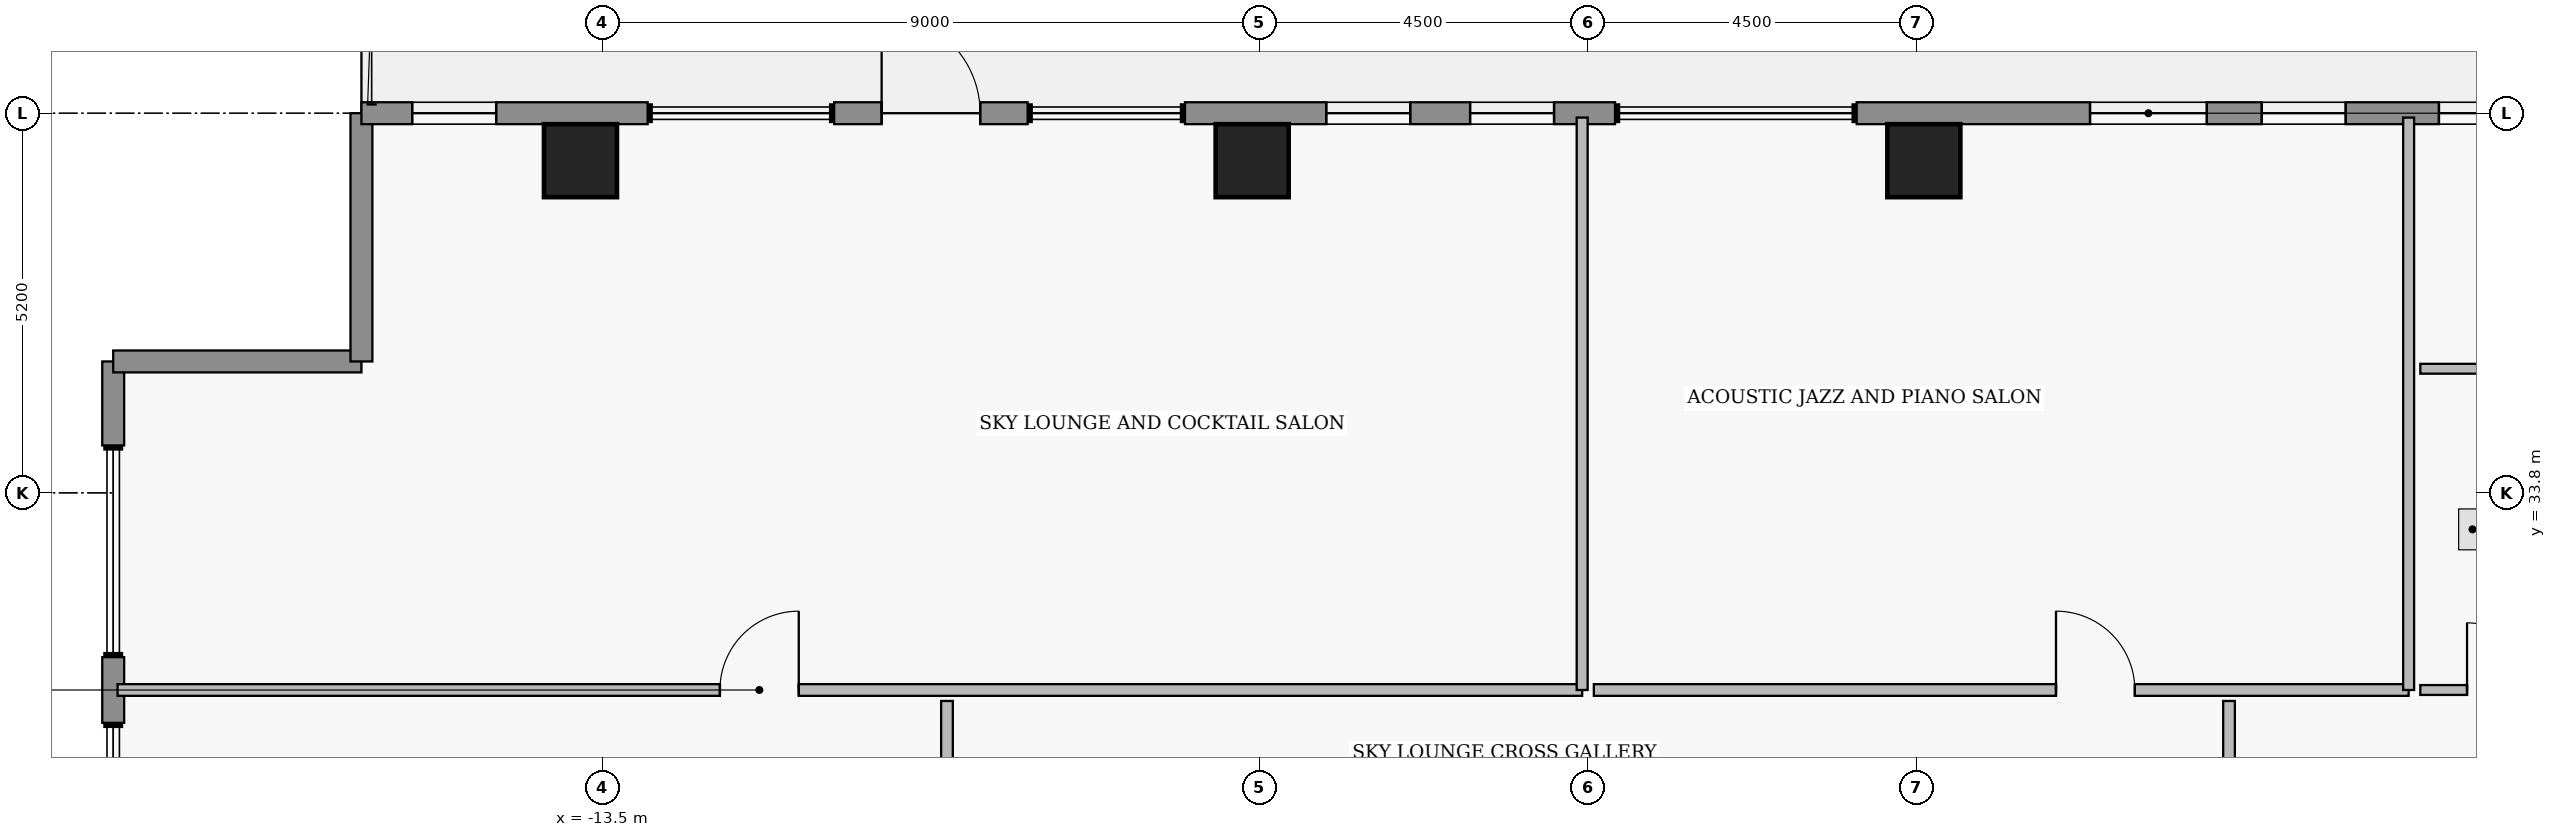
"""IFC4 building model, lengths in metres.
Left out: names, types, materials, properties, quantities, classifications, styles, units other than length and angle.
Written with IfcOpenShell. Run it as: python <this file> out.ifc"""

import sys

from ifc_helpers import new_model, si_unit, direction, frame, frame_2d, origin, origin_2d, place, context, subcontext, project, spatial, rectangle, extrude, element, fill, save


model = new_model("IFC4")
c1 = context("Model", 3, precision=1e-05, world=origin(), true_north=direction((0.0, 1.0)))
c2 = subcontext(c1, "Body", "Model", "MODEL_VIEW")
j1 = project(units=[si_unit("LENGTHUNIT", "METRE"), si_unit("PLANEANGLEUNIT", "RADIAN")], contexts=[c1])
p1 = place(None, origin())
s1 = spatial("IfcSite", under=j1, at=p1, CompositionType="ELEMENT")
p2 = place(p1, origin())
s2 = spatial("IfcBuilding", under=s1, at=p2, CompositionType="ELEMENT")
p3 = place(p2, frame((0.0, 0.0, 288.45)))
s3 = spatial("IfcBuildingStorey", under=s2, at=p3, CompositionType="ELEMENT", Elevation=288.45)
for number, where, z_axis, x_axis in (
    (1, (-13.8, 38.35, 0.0), (0.0, 0.0, 1.0), (1.0, 0.0, 0.0)),
    (2, (-4.6, 38.35, 0.0), (0.0, 0.0, 1.0), (1.0, 0.0, 0.0)),
    (3, (4.6, 38.35, 0.0), (0.0, 0.0, 1.0), (1.0, 0.0, 0.0)),
):
    element("IfcColumn", number, at=place(p3, frame(where, z_axis=z_axis, x_axis=x_axis)), inside=s3, PredefinedType="COLUMN", context=c2, shape_type="SweptSolid", body=[
        extrude(rectangle(XDim=1.0, YDim=1.0, at=origin_2d()), origin(), (0.0, 0.0, 1.0), 4.4),
    ])
p4 = place(p3, frame((-20.2, 30.65, 0.0), z_axis=(0.0, 0.0, 1.0), x_axis=(0.0, 1.0, 0.0)))
e4 = element("IfcWall", 4, at=p4, inside=s3, PredefinedType="STANDARD", context=c2, shape_type="SweptSolid", body=[
    extrude(rectangle(XDim=0.9, YDim=0.3, at=frame_2d((0.45, 0.0))), origin(), (0.0, 0.0, 1.0), 4.18),
])
p5 = place(p3, frame((-20.2, 34.45, 0.0), z_axis=(0.0, 0.0, 1.0), x_axis=(0.0, 1.0, 0.0)))
e5 = element("IfcWall", 5, at=p5, inside=s3, PredefinedType="STANDARD", context=c2, shape_type="SweptSolid", body=[
    extrude(rectangle(XDim=1.15, YDim=0.3, at=frame_2d((0.575, 0.0))), origin(), (0.0, 0.0, 1.0), 4.18),
])
for number, where, z_axis, x_axis in (
    (6, (-20.2, 35.6, 0.0), (0.0, 0.0, 1.0), (1.0, 0.0, 0.0)),
    (7, (-16.8, 35.6, 0.0), (0.0, 0.0, 1.0), (0.0, 1.0, 0.0)),
):
    element("IfcWall", number, at=place(p3, frame(where, z_axis=z_axis, x_axis=x_axis)), inside=s3, PredefinedType="STANDARD", context=c2, shape_type="SweptSolid", body=[
        extrude(rectangle(XDim=3.4, YDim=0.3, at=frame_2d((1.7, 0.0))), origin(), (0.0, 0.0, 1.0), 4.18),
    ])
p6 = place(p3, frame((-16.8, 39.0, 0.0), z_axis=(0.0, 0.0, 1.0), x_axis=(1.0, 0.0, 0.0)))
e8 = element("IfcWall", 8, at=p6, inside=s3, PredefinedType="STANDARD", context=c2, shape_type="SweptSolid", body=[
    extrude(rectangle(XDim=3.92, YDim=0.3, at=frame_2d((1.96, 0.0))), origin(), (0.0, 0.0, 1.0), 4.18),
])
p7 = place(p6, frame((0.695, 0.0, 0.95)))
e9 = element("IfcOpeningElement", 9, at=p7, cuts=e8, PredefinedType="OPENING", context=c2, shape_type="SweptSolid", body=[
    extrude(rectangle(XDim=1.15, YDim=1.55, at=frame_2d((0.575, 0.775))), frame((0.0, 0.16, 0.0), z_axis=(0.0, -1.0, 0.0), x_axis=(1.0, 0.0, 0.0)), (0.0, 0.0, 1.0), 0.32),
])
p8 = place(p3, frame((-10.325, 39.0, 0.0), z_axis=(0.0, 0.0, 1.0), x_axis=(1.0, 0.0, 0.0)))
e10 = element("IfcWall", 10, at=p8, inside=s3, PredefinedType="STANDARD", context=c2, shape_type="SweptSolid", body=[
    extrude(rectangle(XDim=2.65, YDim=0.3, at=frame_2d((1.325, 0.0))), origin(), (0.0, 0.0, 1.0), 4.18),
])
p9 = place(p8, frame((0.65, 0.0, 0.0)))
e11 = element("IfcOpeningElement", 11, at=p9, cuts=e10, PredefinedType="OPENING", context=c2, shape_type="SweptSolid", body=[
    extrude(rectangle(XDim=1.35, YDim=2.3, at=frame_2d((0.675, 1.15))), frame((0.0, 0.16, 0.0), z_axis=(0.0, -1.0, 0.0), x_axis=(1.0, 0.0, 0.0)), (0.0, 0.0, 1.0), 0.32),
])
p10 = place(p3, frame((-5.52, 39.0, 0.0), z_axis=(0.0, 0.0, 1.0), x_axis=(1.0, 0.0, 0.0)))
e12 = element("IfcWall", 12, at=p10, inside=s3, PredefinedType="STANDARD", context=c2, shape_type="SweptSolid", body=[
    extrude(rectangle(XDim=5.89, YDim=0.3, at=frame_2d((2.945, 0.0))), origin(), (0.0, 0.0, 1.0), 4.18),
])
p11 = place(p10, frame((1.935, 0.0, 0.95)))
e13 = element("IfcOpeningElement", 13, at=p11, cuts=e12, PredefinedType="OPENING", context=c2, shape_type="SweptSolid", body=[
    extrude(rectangle(XDim=1.15, YDim=1.55, at=frame_2d((0.575, 0.775))), frame((0.0, 0.16, 0.0), z_axis=(0.0, -1.0, 0.0), x_axis=(1.0, 0.0, 0.0)), (0.0, 0.0, 1.0), 0.32),
])
p12 = place(p10, frame((3.905, 0.0, 0.95)))
e14 = element("IfcOpeningElement", 14, at=p12, cuts=e12, PredefinedType="OPENING", context=c2, shape_type="SweptSolid", body=[
    extrude(rectangle(XDim=1.15, YDim=1.55, at=frame_2d((0.575, 0.775))), frame((0.0, 0.16, 0.0), z_axis=(0.0, -1.0, 0.0), x_axis=(1.0, 0.0, 0.0)), (0.0, 0.0, 1.0), 0.32),
])
p13 = place(p3, frame((3.68, 39.0, 0.0), z_axis=(0.0, 0.0, 1.0), x_axis=(1.0, 0.0, 0.0)))
e15 = element("IfcWall", 15, at=p13, inside=s3, PredefinedType="STANDARD", context=c2, shape_type="SweptSolid", body=[
    extrude(rectangle(XDim=13.12, YDim=0.3, at=frame_2d((6.56, 0.0))), origin(), (0.0, 0.0, 1.0), 4.18),
])
p14 = place(p13, frame((3.196, 0.0, 0.85)))
e16 = element("IfcOpeningElement", 16, at=p14, cuts=e15, PredefinedType="OPENING", context=c2, shape_type="SweptSolid", body=[
    extrude(rectangle(XDim=1.6, YDim=1.8, at=frame_2d((0.8, 0.9))), frame((0.0, 0.16, 0.0), z_axis=(0.0, -1.0, 0.0), x_axis=(1.0, 0.0, 0.0)), (0.0, 0.0, 1.0), 0.32),
])
p15 = place(p13, frame((5.548, 0.0, 0.95)))
e17 = element("IfcOpeningElement", 17, at=p15, cuts=e15, PredefinedType="OPENING", context=c2, shape_type="SweptSolid", body=[
    extrude(rectangle(XDim=1.15, YDim=1.55, at=frame_2d((0.575, 0.775))), frame((0.0, 0.16, 0.0), z_axis=(0.0, -1.0, 0.0), x_axis=(1.0, 0.0, 0.0)), (0.0, 0.0, 1.0), 0.32),
])
p16 = place(p13, frame((7.975, 0.0, 0.95)))
e18 = element("IfcOpeningElement", 18, at=p16, cuts=e15, PredefinedType="OPENING", context=c2, shape_type="SweptSolid", body=[
    extrude(rectangle(XDim=1.15, YDim=1.55, at=frame_2d((0.575, 0.775))), frame((0.0, 0.16, 0.0), z_axis=(0.0, -1.0, 0.0), x_axis=(1.0, 0.0, 0.0)), (0.0, 0.0, 1.0), 0.32),
])
p17 = place(p13, frame((11.275, 0.0, 0.95)))
e19 = element("IfcOpeningElement", 19, at=p17, cuts=e15, PredefinedType="OPENING", context=c2, shape_type="SweptSolid", body=[
    extrude(rectangle(XDim=1.15, YDim=1.55, at=frame_2d((0.575, 0.775))), frame((0.0, 0.16, 0.0), z_axis=(0.0, -1.0, 0.0), x_axis=(1.0, 0.0, 0.0)), (0.0, 0.0, 1.0), 0.32),
])
p18 = place(p3, frame((-20.14, 31.1, 0.0), z_axis=(0.0, 0.0, 1.0), x_axis=(1.0, 0.0, 0.0)))
e20 = element("IfcWall", 20, at=p18, inside=s3, PredefinedType="PARTITIONING", context=c2, shape_type="SweptSolid", body=[
    extrude(rectangle(XDim=20.06, YDim=0.16, at=frame_2d((10.03, 0.0))), origin(), (0.0, 0.0, 1.0), 4.18),
])
p19 = place(p18, frame((8.25, 0.0, 0.0)))
e21 = element("IfcOpeningElement", 21, at=p19, cuts=e20, PredefinedType="OPENING", context=c2, shape_type="SweptSolid", body=[
    extrude(rectangle(XDim=1.08, YDim=2.18, at=frame_2d((0.54, 1.09))), frame((0.0, 0.09, 0.0), z_axis=(0.0, -1.0, 0.0), x_axis=(1.0, 0.0, 0.0)), (0.0, 0.0, 1.0), 0.18),
])
p20 = place(p3, frame((0.08, 31.1, 0.0), z_axis=(0.0, 0.0, 1.0), x_axis=(1.0, 0.0, 0.0)))
e22 = element("IfcWall", 22, at=p20, inside=s3, PredefinedType="PARTITIONING", context=c2, shape_type="SweptSolid", body=[
    extrude(rectangle(XDim=11.16, YDim=0.16, at=frame_2d((5.58, 0.0))), origin(), (0.0, 0.0, 1.0), 4.18),
])
p21 = place(p20, frame((6.33, 0.0, 0.0)))
e23 = element("IfcOpeningElement", 23, at=p21, cuts=e22, PredefinedType="OPENING", context=c2, shape_type="SweptSolid", body=[
    extrude(rectangle(XDim=1.08, YDim=2.18, at=frame_2d((0.54, 1.09))), frame((0.0, 0.09, 0.0), z_axis=(0.0, -1.0, 0.0), x_axis=(1.0, 0.0, 0.0)), (0.0, 0.0, 1.0), 0.18),
])
p22 = place(p3, frame((-8.78, 16.75, 0.0), z_axis=(0.0, 0.0, 1.0), x_axis=(0.0, 1.0, 0.0)))
e24 = element("IfcWall", 24, at=p22, inside=s3, PredefinedType="PARTITIONING", context=c2, shape_type="SweptSolid", body=[
    extrude(rectangle(XDim=14.2, YDim=0.16, at=frame_2d((7.1, 0.0))), origin(), (0.0, 0.0, 1.0), 4.18),
])
p23 = place(p22, frame((6.56, 0.0, 0.0)))
e25 = element("IfcOpeningElement", 25, at=p23, cuts=e24, PredefinedType="OPENING", context=c2, shape_type="SweptSolid", body=[
    extrude(rectangle(XDim=1.08, YDim=2.18, at=frame_2d((0.54, 1.09))), frame((0.0, 0.09, 0.0), z_axis=(0.0, -1.0, 0.0), x_axis=(1.0, 0.0, 0.0)), (0.0, 0.0, 1.0), 0.18),
])
p24 = place(p3, frame((8.78, 16.75, 0.0), z_axis=(0.0, 0.0, 1.0), x_axis=(0.0, 1.0, 0.0)))
e26 = element("IfcWall", 26, at=p24, inside=s3, PredefinedType="PARTITIONING", context=c2, shape_type="SweptSolid", body=[
    extrude(rectangle(XDim=14.2, YDim=0.16, at=frame_2d((7.1, 0.0))), origin(), (0.0, 0.0, 1.0), 4.18),
])
p25 = place(p24, frame((6.56, 0.0, 0.0)))
e27 = element("IfcOpeningElement", 27, at=p25, cuts=e26, PredefinedType="OPENING", context=c2, shape_type="SweptSolid", body=[
    extrude(rectangle(XDim=1.08, YDim=2.18, at=frame_2d((0.54, 1.09))), frame((0.0, 0.09, 0.0), z_axis=(0.0, -1.0, 0.0), x_axis=(1.0, 0.0, 0.0)), (0.0, 0.0, 1.0), 0.18),
])
p26 = place(p3, frame((11.4, 31.1, 0.0), z_axis=(0.0, 0.0, 1.0), x_axis=(1.0, 0.0, 0.0)))
e28 = element("IfcWall", 28, at=p26, inside=s3, PredefinedType="PLUMBINGWALL", context=c2, shape_type="SweptSolid", body=[
    extrude(rectangle(XDim=2.2, YDim=0.135, at=frame_2d((1.1, 0.0))), origin(), (0.0, 0.0, 1.0), 4.18),
])
p27 = place(p26, frame((0.64, 0.0, 0.0)))
e29 = element("IfcOpeningElement", 29, at=p27, cuts=e28, PredefinedType="OPENING", context=c2, shape_type="SweptSolid", body=[
    extrude(rectangle(XDim=0.92, YDim=2.12, at=frame_2d((0.46, 1.06))), frame((0.0, 0.077, 0.0), z_axis=(0.0, -1.0, 0.0), x_axis=(1.0, 0.0, 0.0)), (0.0, 0.0, 1.0), 0.155),
])
for number, where, z_axis, x_axis in (
    (30, (-0.08, 31.1, 0.0), (0.0, 0.0, 1.0), (0.0, 1.0, 0.0)),
    (31, (11.24, 31.1, 0.0), (0.0, 0.0, 1.0), (0.0, 1.0, 0.0)),
):
    element("IfcWall", number, at=place(p3, frame(where, z_axis=z_axis, x_axis=x_axis)), inside=s3, PredefinedType="PARTITIONING", context=c2, shape_type="SweptSolid", body=[
        extrude(rectangle(XDim=7.84, YDim=0.15, at=frame_2d((3.92, 0.0))), origin(), (0.0, 0.0, 1.0), 4.18),
    ])
p28 = place(p3, frame((11.4, 35.5, 0.0), z_axis=(0.0, 0.0, 1.0), x_axis=(1.0, 0.0, 0.0)))
e32 = element("IfcWall", 32, at=p28, inside=s3, PredefinedType="PLUMBINGWALL", context=c2, shape_type="SweptSolid", body=[
    extrude(rectangle(XDim=4.4, YDim=0.135, at=frame_2d((2.2, 0.0))), origin(), (0.0, 0.0, 1.0), 3.776),
])
p29 = place(p7, origin())
e33 = element("IfcWindow", 33, at=p29, inside=s3, PartitioningType="SINGLE_PANEL", PredefinedType="WINDOW", context=c2, shape_type="SweptSolid", body=[
    extrude(rectangle(XDim=1.15, YDim=1.55, at=frame_2d((0.575, 0.775))), frame((0.0, 0.03, 0.0), z_axis=(0.0, -1.0, 0.0), x_axis=(1.0, 0.0, 0.0)), (0.0, 0.0, 1.0), 0.06),
])
fill(e9, e33)
p30 = place(p9, origin())
e34 = element("IfcDoor", 34, at=p30, inside=s3, OperationType="SINGLE_SWING_LEFT", PredefinedType="DOOR", context=c2, shape_type="SweptSolid", body=[
    extrude(rectangle(XDim=1.35, YDim=2.3, at=frame_2d((0.675, 1.15))), frame((0.0, 0.025, 0.0), z_axis=(0.0, -1.0, 0.0), x_axis=(1.0, 0.0, 0.0)), (0.0, 0.0, 1.0), 0.05),
])
fill(e11, e34)
p31 = place(p11, origin())
e35 = element("IfcWindow", 35, at=p31, inside=s3, PartitioningType="SINGLE_PANEL", PredefinedType="WINDOW", context=c2, shape_type="SweptSolid", body=[
    extrude(rectangle(XDim=1.15, YDim=1.55, at=frame_2d((0.575, 0.775))), frame((0.0, 0.03, 0.0), z_axis=(0.0, -1.0, 0.0), x_axis=(1.0, 0.0, 0.0)), (0.0, 0.0, 1.0), 0.06),
])
fill(e13, e35)
p32 = place(p12, origin())
e36 = element("IfcWindow", 36, at=p32, inside=s3, PartitioningType="SINGLE_PANEL", PredefinedType="WINDOW", context=c2, shape_type="SweptSolid", body=[
    extrude(rectangle(XDim=1.15, YDim=1.55, at=frame_2d((0.575, 0.775))), frame((0.0, 0.03, 0.0), z_axis=(0.0, -1.0, 0.0), x_axis=(1.0, 0.0, 0.0)), (0.0, 0.0, 1.0), 0.06),
])
fill(e14, e36)
p33 = place(p14, origin())
e37 = element("IfcWindow", 37, at=p33, inside=s3, PartitioningType="SINGLE_PANEL", PredefinedType="WINDOW", context=c2, shape_type="SweptSolid", body=[
    extrude(rectangle(XDim=1.6, YDim=1.8, at=frame_2d((0.8, 0.9))), frame((0.0, 0.03, 0.0), z_axis=(0.0, -1.0, 0.0), x_axis=(1.0, 0.0, 0.0)), (0.0, 0.0, 1.0), 0.06),
])
fill(e16, e37)
p34 = place(p15, origin())
e38 = element("IfcWindow", 38, at=p34, inside=s3, PartitioningType="SINGLE_PANEL", PredefinedType="WINDOW", context=c2, shape_type="SweptSolid", body=[
    extrude(rectangle(XDim=1.15, YDim=1.55, at=frame_2d((0.575, 0.775))), frame((0.0, 0.03, 0.0), z_axis=(0.0, -1.0, 0.0), x_axis=(1.0, 0.0, 0.0)), (0.0, 0.0, 1.0), 0.06),
])
fill(e17, e38)
p35 = place(p16, origin())
e39 = element("IfcWindow", 39, at=p35, inside=s3, PartitioningType="SINGLE_PANEL", PredefinedType="WINDOW", context=c2, shape_type="SweptSolid", body=[
    extrude(rectangle(XDim=1.15, YDim=1.55, at=frame_2d((0.575, 0.775))), frame((0.0, 0.03, 0.0), z_axis=(0.0, -1.0, 0.0), x_axis=(1.0, 0.0, 0.0)), (0.0, 0.0, 1.0), 0.06),
])
fill(e18, e39)
p36 = place(p19, origin())
e40 = element("IfcDoor", 40, at=p36, inside=s3, OperationType="SINGLE_SWING_RIGHT", PredefinedType="DOOR", context=c2, shape_type="SweptSolid", body=[
    extrude(rectangle(XDim=1.08, YDim=2.18, at=frame_2d((0.54, 1.09))), frame((0.0, 0.025, 0.0), z_axis=(0.0, -1.0, 0.0), x_axis=(1.0, 0.0, 0.0)), (0.0, 0.0, 1.0), 0.05),
])
fill(e21, e40)
p37 = place(p21, origin())
e41 = element("IfcDoor", 41, at=p37, inside=s3, OperationType="SINGLE_SWING_LEFT", PredefinedType="DOOR", context=c2, shape_type="SweptSolid", body=[
    extrude(rectangle(XDim=1.08, YDim=2.18, at=frame_2d((0.54, 1.09))), frame((0.0, 0.025, 0.0), z_axis=(0.0, -1.0, 0.0), x_axis=(1.0, 0.0, 0.0)), (0.0, 0.0, 1.0), 0.05),
])
fill(e23, e41)
p38 = place(p27, origin())
e42 = element("IfcDoor", 42, at=p38, inside=s3, OperationType="SINGLE_SWING_LEFT", PredefinedType="DOOR", context=c2, shape_type="SweptSolid", body=[
    extrude(rectangle(XDim=0.92, YDim=2.12, at=frame_2d((0.46, 1.06))), frame((0.0, 0.025, 0.0), z_axis=(0.0, -1.0, 0.0), x_axis=(1.0, 0.0, 0.0)), (0.0, 0.0, 1.0), 0.05),
])
fill(e29, e42)
save(model, sys.argv[1])
